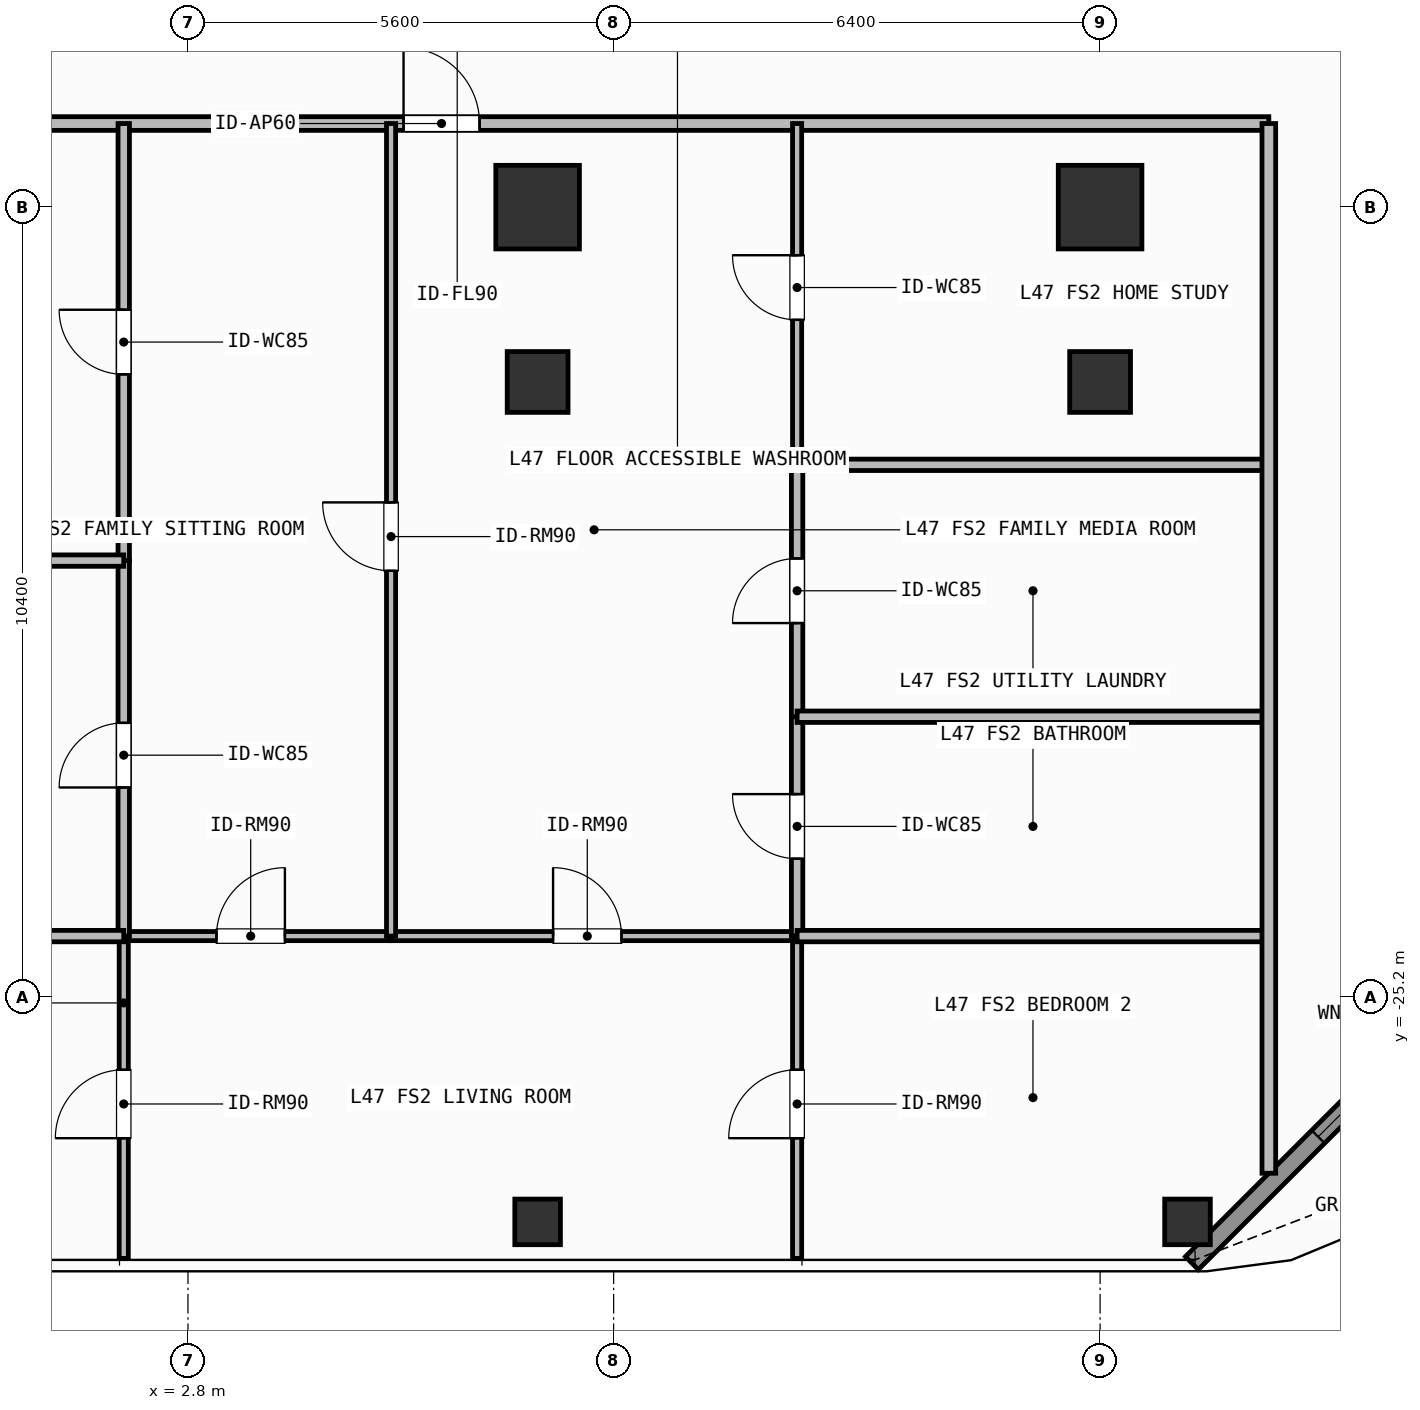
"""IFC4 building model, lengths in metres.
Left out: names, types, materials, properties, quantities, classifications, styles, units other than length and angle.
Written with IfcOpenShell. Run it as: python <this file> out.ifc"""

import sys

from ifc_helpers import new_model, si_unit, direction, frame, frame_2d, origin, origin_2d, place, context, subcontext, project, spatial, rectangle, hollow_rectangle, extrude, element, fill, save


model = new_model("IFC4")
c1 = context("Model", 3, precision=1e-05, world=origin(), true_north=direction((0.0, 1.0)))
c2 = subcontext(c1, "Body", "Model", "MODEL_VIEW")
j1 = project(units=[si_unit("LENGTHUNIT", "METRE"), si_unit("PLANEANGLEUNIT", "RADIAN")], contexts=[c1])
p1 = place(None, origin())
s1 = spatial("IfcSite", under=j1, at=p1, CompositionType="ELEMENT")
p2 = place(p1, origin())
s2 = spatial("IfcBuilding", under=s1, at=p2, CompositionType="ELEMENT")
p3 = place(p2, frame((0.0, 0.0, 191.4)))
s3 = spatial("IfcBuildingStorey", under=s2, at=p3, CompositionType="ELEMENT", Elevation=191.4)
for number, where, z_axis, x_axis in (
    (1, (7.4, -14.8, 0.0), (0.0, 0.0, 1.0), (1.0, 0.0, 0.0)),
    (2, (14.8, -14.8, 0.0), (0.0, 0.0, 1.0), (1.0, 0.0, 0.0)),
):
    element("IfcColumn", number, at=place(p3, frame(where, z_axis=z_axis, x_axis=x_axis)), inside=s3, PredefinedType="COLUMN", context=c2, shape_type="SweptSolid", body=[
        extrude(rectangle(XDim=1.1, YDim=1.1, at=origin_2d()), origin(), (0.0, 0.0, 1.0), 3.9),
    ])
for number, where, z_axis, x_axis in (
    (3, (7.4, -17.1, 0.0), (0.0, 0.0, 1.0), (1.0, 0.0, 0.0)),
    (4, (14.8, -17.1, 0.0), (0.0, 0.0, 1.0), (1.0, 0.0, 0.0)),
):
    element("IfcColumn", number, at=place(p3, frame(where, z_axis=z_axis, x_axis=x_axis)), inside=s3, PredefinedType="COLUMN", context=c2, shape_type="SweptSolid", body=[
        extrude(hollow_rectangle(XDim=0.8, YDim=0.8, WallThickness=0.036, at=origin_2d()), origin(), (0.0, 0.0, 1.0), 3.9),
    ])
for number, where, z_axis, x_axis in (
    (5, (15.95, -28.15, 0.0), (0.0, 0.0, 1.0), (1.0, 0.0, 0.0)),
    (6, (7.4, -28.15, 0.0), (0.0, 0.0, 1.0), (1.0, 0.0, 0.0)),
):
    element("IfcColumn", number, at=place(p3, frame(where, z_axis=z_axis, x_axis=x_axis)), inside=s3, PredefinedType="COLUMN", context=c2, shape_type="SweptSolid", body=[
        extrude(hollow_rectangle(XDim=0.6, YDim=0.6, WallThickness=0.028, at=origin_2d()), origin(), (0.0, 0.0, 1.0), 3.9),
    ])
p4 = place(p3, frame((20.392, -24.308, 0.0), z_axis=(0.0, 0.0, 1.0), x_axis=(-0.707106781187, -0.707106781187, 0.0)))
e7 = element("IfcWall", 7, at=p4, inside=s3, PredefinedType="SOLIDWALL", context=c2, shape_type="SweptSolid", body=[
    extrude(rectangle(XDim=6.201, YDim=0.24, at=frame_2d((3.101, 0.0))), origin(), (0.0, 0.0, 1.0), 3.68),
])
p5 = place(p4, frame((2.351, 0.0, 0.8)))
e8 = element("IfcOpeningElement", 8, at=p5, cuts=e7, PredefinedType="OPENING", context=c2, shape_type="SweptSolid", body=[
    extrude(rectangle(XDim=1.5, YDim=1.85, at=frame_2d((0.75, 0.925))), frame((0.0, 0.13, 0.0), z_axis=(0.0, -1.0, 0.0), x_axis=(1.0, 0.0, 0.0)), (0.0, 0.0, 1.0), 0.26),
])
p6 = place(p3, frame((-4.927, -13.7, 0.0), z_axis=(0.0, 0.0, 1.0), x_axis=(1.0, 0.0, 0.0)))
e9 = element("IfcWall", 9, at=p6, inside=s3, PredefinedType="PARTITIONING", context=c2, shape_type="SweptSolid", body=[
    extrude(rectangle(XDim=21.947, YDim=0.18, at=frame_2d((10.974, 0.0))), origin(), (0.0, 0.0, 1.0), 3.68),
])
p7 = place(p6, frame((10.563, 0.0, 0.0)))
e10 = element("IfcOpeningElement", 10, at=p7, cuts=e9, PredefinedType="OPENING", context=c2, shape_type="SweptSolid", body=[
    extrude(rectangle(XDim=1.0, YDim=2.2, at=frame_2d((0.5, 1.1))), frame((0.0, 0.1, 0.0), z_axis=(0.0, -1.0, 0.0), x_axis=(1.0, 0.0, 0.0)), (0.0, 0.0, 1.0), 0.2),
])
p8 = place(p3, frame((1.955, -24.39, 0.0), z_axis=(0.0, 0.0, 1.0), x_axis=(1.0, 0.0, 0.0)))
e11 = element("IfcWall", 11, at=p8, inside=s3, PredefinedType="PARTITIONING", context=c2, shape_type="SweptSolid", body=[
    extrude(rectangle(XDim=3.517, YDim=0.12, at=frame_2d((1.758, 0.0))), origin(), (0.0, 0.0, 1.0), 3.68),
])
p9 = place(p8, frame((1.22, 0.0, 0.0)))
e12 = element("IfcOpeningElement", 12, at=p9, cuts=e11, PredefinedType="OPENING", context=c2, shape_type="SweptSolid", body=[
    extrude(rectangle(XDim=0.9, YDim=2.1, at=frame_2d((0.45, 1.05))), frame((0.0, 0.07, 0.0), z_axis=(0.0, -1.0, 0.0), x_axis=(1.0, 0.0, 0.0)), (0.0, 0.0, 1.0), 0.14),
])
p10 = place(p3, frame((5.472, -24.39, 0.0), z_axis=(0.0, 0.0, 1.0), x_axis=(1.0, 0.0, 0.0)))
e13 = element("IfcWall", 13, at=p10, inside=s3, PredefinedType="PARTITIONING", context=c2, shape_type="SweptSolid", body=[
    extrude(rectangle(XDim=5.342, YDim=0.12, at=frame_2d((2.671, 0.0))), origin(), (0.0, 0.0, 1.0), 3.68),
])
p11 = place(p10, frame((2.131, 0.0, 0.0)))
e14 = element("IfcOpeningElement", 14, at=p11, cuts=e13, PredefinedType="OPENING", context=c2, shape_type="SweptSolid", body=[
    extrude(rectangle(XDim=0.9, YDim=2.1, at=frame_2d((0.45, 1.05))), frame((0.0, 0.07, 0.0), z_axis=(0.0, -1.0, 0.0), x_axis=(1.0, 0.0, 0.0)), (0.0, 0.0, 1.0), 0.14),
])
p12 = place(p3, frame((5.472, -24.39, 0.0), z_axis=(0.0, 0.0, 1.0), x_axis=(0.0, 1.0, 0.0)))
e15 = element("IfcWall", 15, at=p12, inside=s3, PredefinedType="PARTITIONING", context=c2, shape_type="SweptSolid", body=[
    extrude(rectangle(XDim=10.69, YDim=0.12, at=frame_2d((5.345, 0.0))), origin(), (0.0, 0.0, 1.0), 3.68),
])
p13 = place(p12, frame((4.806, 0.0, 0.0)))
e16 = element("IfcOpeningElement", 16, at=p13, cuts=e15, PredefinedType="OPENING", context=c2, shape_type="SweptSolid", body=[
    extrude(rectangle(XDim=0.9, YDim=2.1, at=frame_2d((0.45, 1.05))), frame((0.0, 0.07, 0.0), z_axis=(0.0, -1.0, 0.0), x_axis=(1.0, 0.0, 0.0)), (0.0, 0.0, 1.0), 0.14),
])
p14 = place(p3, frame((1.955, -24.39, 0.0), z_axis=(0.0, 0.0, 1.0), x_axis=(0.0, 1.0, 0.0)))
e17 = element("IfcWall", 17, at=p14, inside=s3, PredefinedType="PARTITIONING", context=c2, shape_type="SweptSolid", body=[
    extrude(rectangle(XDim=4.94, YDim=0.15, at=frame_2d((2.47, 0.0))), origin(), (0.0, 0.0, 1.0), 3.68),
])
p15 = place(p14, frame((1.955, 0.0, 0.0)))
e18 = element("IfcOpeningElement", 18, at=p15, cuts=e17, PredefinedType="OPENING", context=c2, shape_type="SweptSolid", body=[
    extrude(rectangle(XDim=0.85, YDim=2.1, at=frame_2d((0.425, 1.05))), frame((0.0, 0.085, 0.0), z_axis=(0.0, -1.0, 0.0), x_axis=(1.0, 0.0, 0.0)), (0.0, 0.0, 1.0), 0.17),
])
p16 = place(p3, frame((1.955, -19.45, 0.0), z_axis=(0.0, 0.0, 1.0), x_axis=(0.0, 1.0, 0.0)))
e19 = element("IfcWall", 19, at=p16, inside=s3, PredefinedType="PARTITIONING", context=c2, shape_type="SweptSolid", body=[
    extrude(rectangle(XDim=5.75, YDim=0.15, at=frame_2d((2.875, 0.0))), origin(), (0.0, 0.0, 1.0), 3.68),
])
p17 = place(p16, frame((2.45, 0.0, 0.0)))
e20 = element("IfcOpeningElement", 20, at=p17, cuts=e19, PredefinedType="OPENING", context=c2, shape_type="SweptSolid", body=[
    extrude(rectangle(XDim=0.85, YDim=2.1, at=frame_2d((0.425, 1.05))), frame((0.0, 0.085, 0.0), z_axis=(0.0, -1.0, 0.0), x_axis=(1.0, 0.0, 0.0)), (0.0, 0.0, 1.0), 0.17),
])
p18 = place(p3, frame((1.955, -28.63, 0.0), z_axis=(0.0, 0.0, 1.0), x_axis=(0.0, 1.0, 0.0)))
e21 = element("IfcWall", 21, at=p18, inside=s3, PredefinedType="PARTITIONING", context=c2, shape_type="SweptSolid", body=[
    extrude(rectangle(XDim=4.24, YDim=0.12, at=frame_2d((2.12, 0.0))), origin(), (0.0, 0.0, 1.0), 3.68),
])
p19 = place(p18, frame((1.581, 0.0, 0.0)))
e22 = element("IfcOpeningElement", 22, at=p19, cuts=e21, PredefinedType="OPENING", context=c2, shape_type="SweptSolid", body=[
    extrude(rectangle(XDim=0.9, YDim=2.1, at=frame_2d((0.45, 1.05))), frame((0.0, 0.07, 0.0), z_axis=(0.0, -1.0, 0.0), x_axis=(1.0, 0.0, 0.0)), (0.0, 0.0, 1.0), 0.14),
])
p20 = place(p3, frame((10.814, -24.39, 0.0), z_axis=(0.0, 0.0, 1.0), x_axis=(0.0, 1.0, 0.0)))
e23 = element("IfcWall", 23, at=p20, inside=s3, PredefinedType="PARTITIONING", context=c2, shape_type="SweptSolid", body=[
    extrude(rectangle(XDim=2.886, YDim=0.15, at=frame_2d((1.443, 0.0))), origin(), (0.0, 0.0, 1.0), 3.68),
])
p21 = place(p20, frame((1.018, 0.0, 0.0)))
e24 = element("IfcOpeningElement", 24, at=p21, cuts=e23, PredefinedType="OPENING", context=c2, shape_type="SweptSolid", body=[
    extrude(rectangle(XDim=0.85, YDim=2.1, at=frame_2d((0.425, 1.05))), frame((0.0, 0.085, 0.0), z_axis=(0.0, -1.0, 0.0), x_axis=(1.0, 0.0, 0.0)), (0.0, 0.0, 1.0), 0.17),
])
p22 = place(p3, frame((10.814, -21.504, 0.0), z_axis=(0.0, 0.0, 1.0), x_axis=(0.0, 1.0, 0.0)))
e25 = element("IfcWall", 25, at=p22, inside=s3, PredefinedType="PARTITIONING", context=c2, shape_type="SweptSolid", body=[
    extrude(rectangle(XDim=3.314, YDim=0.15, at=frame_2d((1.657, 0.0))), origin(), (0.0, 0.0, 1.0), 3.68),
])
p23 = place(p22, frame((1.232, 0.0, 0.0)))
e26 = element("IfcOpeningElement", 26, at=p23, cuts=e25, PredefinedType="OPENING", context=c2, shape_type="SweptSolid", body=[
    extrude(rectangle(XDim=0.85, YDim=2.1, at=frame_2d((0.425, 1.05))), frame((0.0, 0.085, 0.0), z_axis=(0.0, -1.0, 0.0), x_axis=(1.0, 0.0, 0.0)), (0.0, 0.0, 1.0), 0.17),
])
p24 = place(p3, frame((10.814, -18.19, 0.0), z_axis=(0.0, 0.0, 1.0), x_axis=(0.0, 1.0, 0.0)))
e27 = element("IfcWall", 27, at=p24, inside=s3, PredefinedType="PARTITIONING", context=c2, shape_type="SweptSolid", body=[
    extrude(rectangle(XDim=4.49, YDim=0.12, at=frame_2d((2.245, 0.0))), origin(), (0.0, 0.0, 1.0), 3.68),
])
p25 = place(p24, frame((1.907, 0.0, 0.0)))
e28 = element("IfcOpeningElement", 28, at=p25, cuts=e27, PredefinedType="OPENING", context=c2, shape_type="SweptSolid", body=[
    extrude(rectangle(XDim=0.85, YDim=2.1, at=frame_2d((0.425, 1.05))), frame((0.0, 0.07, 0.0), z_axis=(0.0, -1.0, 0.0), x_axis=(1.0, 0.0, 0.0)), (0.0, 0.0, 1.0), 0.14),
])
p26 = place(p3, frame((10.814, -28.63, 0.0), z_axis=(0.0, 0.0, 1.0), x_axis=(0.0, 1.0, 0.0)))
e29 = element("IfcWall", 29, at=p26, inside=s3, PredefinedType="PARTITIONING", context=c2, shape_type="SweptSolid", body=[
    extrude(rectangle(XDim=4.24, YDim=0.12, at=frame_2d((2.12, 0.0))), origin(), (0.0, 0.0, 1.0), 3.68),
])
p27 = place(p26, frame((1.581, 0.0, 0.0)))
e30 = element("IfcOpeningElement", 30, at=p27, cuts=e29, PredefinedType="OPENING", context=c2, shape_type="SweptSolid", body=[
    extrude(rectangle(XDim=0.9, YDim=2.1, at=frame_2d((0.45, 1.05))), frame((0.0, 0.07, 0.0), z_axis=(0.0, -1.0, 0.0), x_axis=(1.0, 0.0, 0.0)), (0.0, 0.0, 1.0), 0.14),
])
for number, where, z_axis, x_axis in (
    (31, (-4.927, -19.45, 0.0), (0.0, 0.0, 1.0), (1.0, 0.0, 0.0)),
    (32, (-4.927, -24.39, 0.0), (0.0, 0.0, 1.0), (1.0, 0.0, 0.0)),
):
    element("IfcWall", number, at=place(p3, frame(where, z_axis=z_axis, x_axis=x_axis)), inside=s3, PredefinedType="PARTITIONING", context=c2, shape_type="SweptSolid", body=[
        extrude(rectangle(XDim=6.882, YDim=0.15, at=frame_2d((3.441, 0.0))), origin(), (0.0, 0.0, 1.0), 3.68),
    ])
p28 = place(p3, frame((10.814, -21.504, 0.0), z_axis=(0.0, 0.0, 1.0), x_axis=(1.0, 0.0, 0.0)))
e33 = element("IfcWall", 33, at=p28, inside=s3, PredefinedType="PARTITIONING", context=c2, shape_type="SweptSolid", body=[
    extrude(rectangle(XDim=6.206, YDim=0.15, at=frame_2d((3.103, 0.0))), origin(), (0.0, 0.0, 1.0), 3.42),
])
for number, where, z_axis, x_axis in (
    (34, (10.814, -18.19, 0.0), (0.0, 0.0, 1.0), (1.0, 0.0, 0.0)),
    (35, (10.814, -24.39, 0.0), (0.0, 0.0, 1.0), (1.0, 0.0, 0.0)),
):
    element("IfcWall", number, at=place(p3, frame(where, z_axis=z_axis, x_axis=x_axis)), inside=s3, PredefinedType="PARTITIONING", context=c2, shape_type="SweptSolid", body=[
        extrude(rectangle(XDim=6.206, YDim=0.15, at=frame_2d((3.103, 0.0))), origin(), (0.0, 0.0, 1.0), 3.68),
    ])
p29 = place(p3, frame((17.02, -27.51, 0.0), z_axis=(0.0, 0.0, 1.0), x_axis=(0.0, 1.0, 0.0)))
e36 = element("IfcWall", 36, at=p29, inside=s3, PredefinedType="PARTITIONING", context=c2, shape_type="SweptSolid", body=[
    extrude(rectangle(XDim=13.81, YDim=0.18, at=frame_2d((6.905, 0.0))), origin(), (0.0, 0.0, 1.0), 3.68),
])
p30 = place(p5, origin())
e37 = element("IfcWindow", 37, at=p30, inside=s3, PartitioningType="SINGLE_PANEL", PredefinedType="WINDOW", context=c2, shape_type="SweptSolid", body=[
    extrude(rectangle(XDim=1.5, YDim=1.85, at=frame_2d((0.75, 0.925))), frame((0.0, 0.03, 0.0), z_axis=(0.0, -1.0, 0.0), x_axis=(1.0, 0.0, 0.0)), (0.0, 0.0, 1.0), 0.06),
])
fill(e8, e37)
p31 = place(p7, origin())
e38 = element("IfcDoor", 38, at=p31, inside=s3, OperationType="SINGLE_SWING_LEFT", PredefinedType="DOOR", context=c2, shape_type="SweptSolid", body=[
    extrude(rectangle(XDim=1.0, YDim=2.2, at=frame_2d((0.5, 1.1))), frame((0.0, 0.025, 0.0), z_axis=(0.0, -1.0, 0.0), x_axis=(1.0, 0.0, 0.0)), (0.0, 0.0, 1.0), 0.05),
])
fill(e10, e38)
p32 = place(p9, origin())
e39 = element("IfcDoor", 39, at=p32, inside=s3, OperationType="SINGLE_SWING_RIGHT", PredefinedType="DOOR", context=c2, shape_type="SweptSolid", body=[
    extrude(rectangle(XDim=0.9, YDim=2.1, at=frame_2d((0.45, 1.05))), frame((0.0, 0.025, 0.0), z_axis=(0.0, -1.0, 0.0), x_axis=(1.0, 0.0, 0.0)), (0.0, 0.0, 1.0), 0.05),
])
fill(e12, e39)
p33 = place(p11, origin())
e40 = element("IfcDoor", 40, at=p33, inside=s3, OperationType="SINGLE_SWING_LEFT", PredefinedType="DOOR", context=c2, shape_type="SweptSolid", body=[
    extrude(rectangle(XDim=0.9, YDim=2.1, at=frame_2d((0.45, 1.05))), frame((0.0, 0.025, 0.0), z_axis=(0.0, -1.0, 0.0), x_axis=(1.0, 0.0, 0.0)), (0.0, 0.0, 1.0), 0.05),
])
fill(e14, e40)
p34 = place(p13, origin())
e41 = element("IfcDoor", 41, at=p34, inside=s3, OperationType="SINGLE_SWING_RIGHT", PredefinedType="DOOR", context=c2, shape_type="SweptSolid", body=[
    extrude(rectangle(XDim=0.9, YDim=2.1, at=frame_2d((0.45, 1.05))), frame((0.0, 0.025, 0.0), z_axis=(0.0, -1.0, 0.0), x_axis=(1.0, 0.0, 0.0)), (0.0, 0.0, 1.0), 0.05),
])
fill(e16, e41)
p35 = place(p15, origin())
e42 = element("IfcDoor", 42, at=p35, inside=s3, OperationType="SINGLE_SWING_LEFT", PredefinedType="DOOR", context=c2, shape_type="SweptSolid", body=[
    extrude(rectangle(XDim=0.85, YDim=2.1, at=frame_2d((0.425, 1.05))), frame((0.0, 0.025, 0.0), z_axis=(0.0, -1.0, 0.0), x_axis=(1.0, 0.0, 0.0)), (0.0, 0.0, 1.0), 0.05),
])
fill(e18, e42)
p36 = place(p17, origin())
e43 = element("IfcDoor", 43, at=p36, inside=s3, OperationType="SINGLE_SWING_RIGHT", PredefinedType="DOOR", context=c2, shape_type="SweptSolid", body=[
    extrude(rectangle(XDim=0.85, YDim=2.1, at=frame_2d((0.425, 1.05))), frame((0.0, 0.025, 0.0), z_axis=(0.0, -1.0, 0.0), x_axis=(1.0, 0.0, 0.0)), (0.0, 0.0, 1.0), 0.05),
])
fill(e20, e43)
p37 = place(p19, origin())
e44 = element("IfcDoor", 44, at=p37, inside=s3, OperationType="SINGLE_SWING_LEFT", PredefinedType="DOOR", context=c2, shape_type="SweptSolid", body=[
    extrude(rectangle(XDim=0.9, YDim=2.1, at=frame_2d((0.45, 1.05))), frame((0.0, 0.025, 0.0), z_axis=(0.0, -1.0, 0.0), x_axis=(1.0, 0.0, 0.0)), (0.0, 0.0, 1.0), 0.05),
])
fill(e22, e44)
p38 = place(p21, origin())
e45 = element("IfcDoor", 45, at=p38, inside=s3, OperationType="SINGLE_SWING_RIGHT", PredefinedType="DOOR", context=c2, shape_type="SweptSolid", body=[
    extrude(rectangle(XDim=0.85, YDim=2.1, at=frame_2d((0.425, 1.05))), frame((0.0, 0.025, 0.0), z_axis=(0.0, -1.0, 0.0), x_axis=(1.0, 0.0, 0.0)), (0.0, 0.0, 1.0), 0.05),
])
fill(e24, e45)
p39 = place(p23, origin())
e46 = element("IfcDoor", 46, at=p39, inside=s3, OperationType="SINGLE_SWING_LEFT", PredefinedType="DOOR", context=c2, shape_type="SweptSolid", body=[
    extrude(rectangle(XDim=0.85, YDim=2.1, at=frame_2d((0.425, 1.05))), frame((0.0, 0.025, 0.0), z_axis=(0.0, -1.0, 0.0), x_axis=(1.0, 0.0, 0.0)), (0.0, 0.0, 1.0), 0.05),
])
fill(e26, e46)
p40 = place(p25, origin())
e47 = element("IfcDoor", 47, at=p40, inside=s3, OperationType="SINGLE_SWING_RIGHT", PredefinedType="DOOR", context=c2, shape_type="SweptSolid", body=[
    extrude(rectangle(XDim=0.85, YDim=2.1, at=frame_2d((0.425, 1.05))), frame((0.0, 0.025, 0.0), z_axis=(0.0, -1.0, 0.0), x_axis=(1.0, 0.0, 0.0)), (0.0, 0.0, 1.0), 0.05),
])
fill(e28, e47)
p41 = place(p27, origin())
e48 = element("IfcDoor", 48, at=p41, inside=s3, OperationType="SINGLE_SWING_LEFT", PredefinedType="DOOR", context=c2, shape_type="SweptSolid", body=[
    extrude(rectangle(XDim=0.9, YDim=2.1, at=frame_2d((0.45, 1.05))), frame((0.0, 0.025, 0.0), z_axis=(0.0, -1.0, 0.0), x_axis=(1.0, 0.0, 0.0)), (0.0, 0.0, 1.0), 0.05),
])
fill(e30, e48)
save(model, sys.argv[1])
